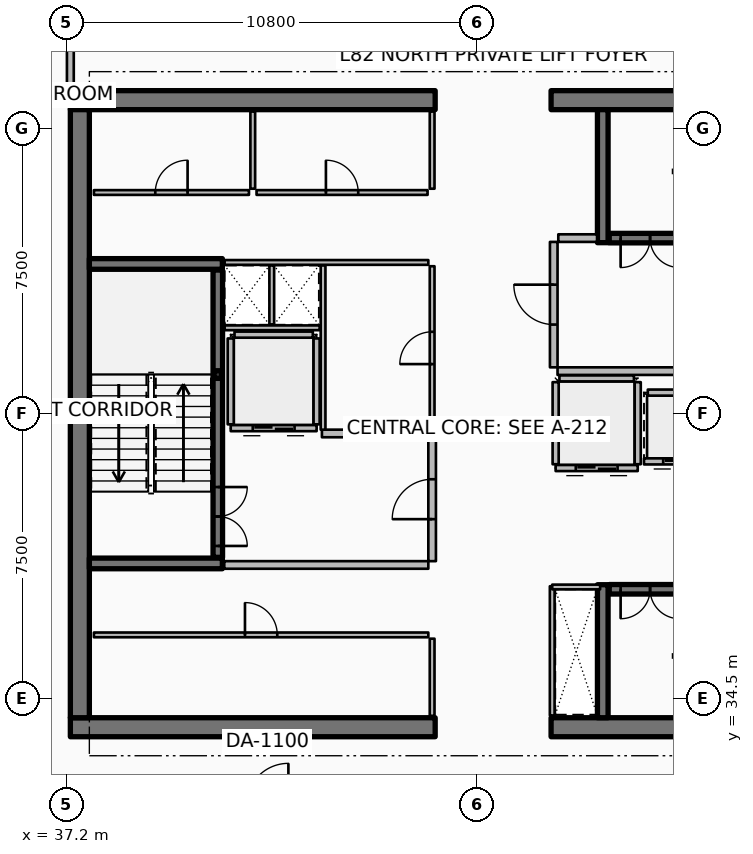
"""IFC4 building model, lengths in metres.
Left out: names, types, materials, properties, quantities, classifications, styles, units other than length and angle.
Written with IfcOpenShell. Run it as: python <this file> out.ifc"""

import sys

from ifc_helpers import new_model, si_unit, direction, frame, frame_2d, origin, origin_2d, place, context, subcontext, project, spatial, rectangle, hollow_rectangle, extrude, element, fill, save


model = new_model("IFC4")
c1 = context("Model", 3, precision=1e-05, world=origin(), true_north=direction((0.0, 1.0)))
c2 = subcontext(c1, "Body", "Model", "MODEL_VIEW")
j1 = project(units=[si_unit("LENGTHUNIT", "METRE"), si_unit("PLANEANGLEUNIT", "RADIAN")], contexts=[c1])
p1 = place(None, origin())
s1 = spatial("IfcSite", under=j1, at=p1, CompositionType="ELEMENT")
p2 = place(p1, origin())
s2 = spatial("IfcBuilding", under=s1, at=p2, CompositionType="ELEMENT")
p3 = place(p2, frame((0.0, 0.0, 326.3)))
s3 = spatial("IfcBuildingStorey", under=s2, at=p3, CompositionType="ELEMENT", Elevation=326.3)
p4 = place(p3, frame((37.3, 33.75, 0.0), z_axis=(0.0, 0.0, 1.0), x_axis=(1.0, 0.0, 0.0)))
e1 = element("IfcWall", 1, at=p4, inside=s3, PredefinedType="SHEAR", context=c2, shape_type="SweptSolid", body=[
    extrude(rectangle(XDim=9.6, YDim=0.5, at=frame_2d((4.8, 0.0))), origin(), (0.0, 0.0, 1.0), 4.2),
])
p5 = place(p3, frame((49.95, 33.75, 0.0), z_axis=(0.0, 0.0, 1.0), x_axis=(1.0, 0.0, 0.0)))
e2 = element("IfcWall", 2, at=p5, inside=s3, PredefinedType="SHEAR", context=c2, shape_type="SweptSolid", body=[
    extrude(rectangle(XDim=9.6, YDim=0.5, at=frame_2d((4.8, 0.0))), origin(), (0.0, 0.0, 1.0), 4.2),
])
p6 = place(p3, frame((37.3, 50.25, 0.0), z_axis=(0.0, 0.0, 1.0), x_axis=(1.0, 0.0, 0.0)))
e3 = element("IfcWall", 3, at=p6, inside=s3, PredefinedType="SHEAR", context=c2, shape_type="SweptSolid", body=[
    extrude(rectangle(XDim=9.6, YDim=0.5, at=frame_2d((4.8, 0.0))), origin(), (0.0, 0.0, 1.0), 4.2),
])
p7 = place(p3, frame((49.95, 50.25, 0.0), z_axis=(0.0, 0.0, 1.0), x_axis=(1.0, 0.0, 0.0)))
e4 = element("IfcWall", 4, at=p7, inside=s3, PredefinedType="SHEAR", context=c2, shape_type="SweptSolid", body=[
    extrude(rectangle(XDim=9.6, YDim=0.5, at=frame_2d((4.8, 0.0))), origin(), (0.0, 0.0, 1.0), 4.2),
])
p8 = place(p3, frame((37.55, 34.0, 0.0), z_axis=(0.0, 0.0, 1.0), x_axis=(0.0, 1.0, 0.0)))
e5 = element("IfcWall", 5, at=p8, inside=s3, PredefinedType="SHEAR", context=c2, shape_type="SweptSolid", body=[
    extrude(rectangle(XDim=16.0, YDim=0.5, at=frame_2d((8.0, 0.0))), origin(), (0.0, 0.0, 1.0), 4.2),
])
for number, where, z_axis, x_axis in (
    (6, (37.8, 38.06, 0.0), (0.0, 0.0, 1.0), (1.0, 0.0, 0.0)),
    (7, (37.8, 45.94, 0.0), (0.0, 0.0, 1.0), (1.0, 0.0, 0.0)),
    (8, (51.31, 46.5, 0.0), (0.0, 0.0, 1.0), (0.0, 1.0, 0.0)),
    (9, (51.31, 34.0, 0.0), (0.0, 0.0, 1.0), (0.0, 1.0, 0.0)),
):
    element("IfcWall", number, at=place(p3, frame(where, z_axis=z_axis, x_axis=x_axis)), inside=s3, PredefinedType="SHEAR", context=c2, shape_type="SweptSolid", body=[
        extrude(rectangle(XDim=3.5, YDim=0.28, at=frame_2d((1.75, 0.0))), origin(), (0.0, 0.0, 1.0), 4.2),
    ])
p9 = place(p3, frame((41.18, 43.03, 0.0), z_axis=(0.0, 0.0, 1.0), x_axis=(1.0, 0.0, 0.0)))
e10 = element("IfcColumn", 10, at=p9, inside=s3, PredefinedType="COLUMN", context=c2, shape_type="SweptSolid", body=[
    extrude(hollow_rectangle(XDim=0.2, YDim=0.2, WallThickness=0.01, InnerFilletRadius=0.01, OuterFilletRadius=0.02, at=origin_2d()), origin(), (0.0, 0.0, 1.0), 1.895),
])
p10 = place(p3, frame((41.18, 38.22, 0.0), z_axis=(0.0, 0.0, 1.0), x_axis=(0.0, 1.0, 0.0)))
e11 = element("IfcWall", 11, at=p10, inside=s3, PredefinedType="SOLIDWALL", context=c2, shape_type="SweptSolid", body=[
    extrude(rectangle(XDim=7.56, YDim=0.25, at=frame_2d((3.78, 0.0))), origin(), (0.0, 0.0, 1.0), 3.94),
])
p11 = place(p10, frame((0.3, 0.0, 0.0)))
e12 = element("IfcOpeningElement", 12, at=p11, cuts=e11, PredefinedType="OPENING", context=c2, shape_type="SweptSolid", body=[
    extrude(rectangle(XDim=1.55, YDim=2.15, at=frame_2d((0.775, 1.075))), frame((0.0, 0.135, 0.0), z_axis=(0.0, -1.0, 0.0), x_axis=(1.0, 0.0, 0.0)), (0.0, 0.0, 1.0), 0.27),
])
p12 = place(p3, frame((51.48, 46.62, 0.0), z_axis=(0.0, 0.0, 1.0), x_axis=(1.0, 0.0, 0.0)))
e13 = element("IfcWall", 13, at=p12, inside=s3, PredefinedType="SOLIDWALL", context=c2, shape_type="SweptSolid", body=[
    extrude(rectangle(XDim=7.54, YDim=0.25, at=frame_2d((3.77, 0.0))), origin(), (0.0, 0.0, 1.0), 3.94),
])
p13 = place(p12, frame((0.3, 0.0, 0.0)))
e14 = element("IfcOpeningElement", 14, at=p13, cuts=e13, PredefinedType="OPENING", context=c2, shape_type="SweptSolid", body=[
    extrude(rectangle(XDim=1.55, YDim=2.15, at=frame_2d((0.775, 1.075))), frame((0.0, 0.135, 0.0), z_axis=(0.0, -1.0, 0.0), x_axis=(1.0, 0.0, 0.0)), (0.0, 0.0, 1.0), 0.27),
])
p14 = place(p3, frame((51.48, 37.38, 0.0), z_axis=(0.0, 0.0, 1.0), x_axis=(1.0, 0.0, 0.0)))
e15 = element("IfcWall", 15, at=p14, inside=s3, PredefinedType="SOLIDWALL", context=c2, shape_type="SweptSolid", body=[
    extrude(rectangle(XDim=7.54, YDim=0.25, at=frame_2d((3.77, 0.0))), origin(), (0.0, 0.0, 1.0), 3.94),
])
p15 = place(p14, frame((0.3, 0.0, 0.0)))
e16 = element("IfcOpeningElement", 16, at=p15, cuts=e15, PredefinedType="OPENING", context=c2, shape_type="SweptSolid", body=[
    extrude(rectangle(XDim=1.55, YDim=2.15, at=frame_2d((0.775, 1.075))), frame((0.0, 0.135, 0.0), z_axis=(0.0, -1.0, 0.0), x_axis=(1.0, 0.0, 0.0)), (0.0, 0.0, 1.0), 0.27),
])
p16 = place(p3, frame((54.505, 40.745, 0.0), z_axis=(0.0, 0.0, 1.0), x_axis=(-1.0, 0.0, 0.0)))
e17 = element("IfcWall", 17, at=p16, inside=s3, PredefinedType="PARTITIONING", context=c2, shape_type="SweptSolid", body=[
    extrude(rectangle(XDim=2.11, YDim=0.16, at=frame_2d((1.055, 0.0))), origin(), (0.0, 0.0, 1.0), 3.94),
])
p17 = place(p16, frame((0.505, 0.0, 0.0)))
e18 = element("IfcOpeningElement", 18, at=p17, cuts=e17, PredefinedType="OPENING", context=c2, shape_type="SweptSolid", body=[
    extrude(rectangle(XDim=1.1, YDim=2.1, at=frame_2d((0.55, 1.05))), frame((0.0, 0.09, 0.0), z_axis=(0.0, -1.0, 0.0), x_axis=(1.0, 0.0, 0.0)), (0.0, 0.0, 1.0), 0.18),
])
p18 = place(p3, frame((52.495, 42.555, 0.0), z_axis=(0.0, 0.0, 1.0), x_axis=(1.0, 0.0, 0.0)))
e19 = element("IfcWall", 19, at=p18, inside=s3, PredefinedType="PARTITIONING", context=c2, shape_type="SweptSolid", body=[
    extrude(rectangle(XDim=1.91, YDim=0.16, at=frame_2d((0.955, 0.0))), origin(), (0.0, 0.0, 1.0), 3.94),
])
p19 = place(p3, frame((43.78, 41.62, 0.0), z_axis=(0.0, 0.0, 1.0), x_axis=(-1.0, 0.0, 0.0)))
e20 = element("IfcWall", 20, at=p19, inside=s3, PredefinedType="PARTITIONING", context=c2, shape_type="SweptSolid", body=[
    extrude(rectangle(XDim=2.26, YDim=0.16, at=frame_2d((1.13, 0.0))), origin(), (0.0, 0.0, 1.0), 3.94),
])
p20 = place(p19, frame((0.58, 0.0, 0.0)))
e21 = element("IfcOpeningElement", 21, at=p20, cuts=e20, PredefinedType="OPENING", context=c2, shape_type="SweptSolid", body=[
    extrude(rectangle(XDim=1.1, YDim=2.1, at=frame_2d((0.55, 1.05))), frame((0.0, 0.09, 0.0), z_axis=(0.0, -1.0, 0.0), x_axis=(1.0, 0.0, 0.0)), (0.0, 0.0, 1.0), 0.18),
])
for number, where, z_axis, x_axis in (
    (22, (43.78, 41.72, 0.0), (0.0, 0.0, 1.0), (0.0, 1.0, 0.0)),
    (23, (41.52, 41.72, 0.0), (0.0, 0.0, 1.0), (0.0, 1.0, 0.0)),
):
    element("IfcWall", number, at=place(p3, frame(where, z_axis=z_axis, x_axis=x_axis)), inside=s3, PredefinedType="PARTITIONING", context=c2, shape_type="SweptSolid", body=[
        extrude(rectangle(XDim=2.26, YDim=0.16, at=frame_2d((1.13, 0.0))), origin(), (0.0, 0.0, 1.0), 3.94),
    ])
p21 = place(p3, frame((41.62, 44.08, 0.0), z_axis=(0.0, 0.0, 1.0), x_axis=(1.0, 0.0, 0.0)))
e24 = element("IfcWall", 24, at=p21, inside=s3, PredefinedType="PARTITIONING", context=c2, shape_type="SweptSolid", body=[
    extrude(rectangle(XDim=2.06, YDim=0.16, at=frame_2d((1.03, 0.0))), origin(), (0.0, 0.0, 1.0), 3.94),
])
p22 = place(p3, frame((52.23, 40.57, 0.0), z_axis=(0.0, 0.0, 1.0), x_axis=(-1.0, 0.0, 0.0)))
e25 = element("IfcWall", 25, at=p22, inside=s3, PredefinedType="PARTITIONING", context=c2, shape_type="SweptSolid", body=[
    extrude(rectangle(XDim=2.16, YDim=0.16, at=frame_2d((1.08, 0.0))), origin(), (0.0, 0.0, 1.0), 3.94),
])
p23 = place(p22, frame((0.53, 0.0, 0.0)))
e26 = element("IfcOpeningElement", 26, at=p23, cuts=e25, PredefinedType="OPENING", context=c2, shape_type="SweptSolid", body=[
    extrude(rectangle(XDim=1.1, YDim=2.1, at=frame_2d((0.55, 1.05))), frame((0.0, 0.09, 0.0), z_axis=(0.0, -1.0, 0.0), x_axis=(1.0, 0.0, 0.0)), (0.0, 0.0, 1.0), 0.18),
])
for number, where, z_axis, x_axis in (
    (27, (52.23, 40.67, 0.0), (0.0, 0.0, 1.0), (0.0, 1.0, 0.0)),
    (28, (50.07, 40.67, 0.0), (0.0, 0.0, 1.0), (0.0, 1.0, 0.0)),
):
    element("IfcWall", number, at=place(p3, frame(where, z_axis=z_axis, x_axis=x_axis)), inside=s3, PredefinedType="PARTITIONING", context=c2, shape_type="SweptSolid", body=[
        extrude(rectangle(XDim=2.16, YDim=0.16, at=frame_2d((1.08, 0.0))), origin(), (0.0, 0.0, 1.0), 3.94),
    ])
p24 = place(p3, frame((50.17, 42.93, 0.0), z_axis=(0.0, 0.0, 1.0), x_axis=(1.0, 0.0, 0.0)))
e29 = element("IfcWall", 29, at=p24, inside=s3, PredefinedType="PARTITIONING", context=c2, shape_type="SweptSolid", body=[
    extrude(rectangle(XDim=1.96, YDim=0.16, at=frame_2d((0.98, 0.0))), origin(), (0.0, 0.0, 1.0), 3.94),
])
p25 = place(p3, frame((46.82, 34.05, 0.0), z_axis=(0.0, 0.0, 1.0), x_axis=(0.0, 1.0, 0.0)))
e30 = element("IfcWall", 30, at=p25, inside=s3, PredefinedType="PARTITIONING", context=c2, shape_type="SweptSolid", body=[
    extrude(rectangle(XDim=2.03, YDim=0.125, at=frame_2d((1.015, 0.0))), origin(), (0.0, 0.0, 1.0), 3.38),
])
p26 = place(p3, frame((37.92, 36.18, 0.0), z_axis=(0.0, 0.0, 1.0), x_axis=(1.0, 0.0, 0.0)))
e31 = element("IfcWall", 31, at=p26, inside=s3, PredefinedType="PARTITIONING", context=c2, shape_type="SweptSolid", body=[
    extrude(rectangle(XDim=8.8, YDim=0.125, at=frame_2d((4.4, 0.0))), origin(), (0.0, 0.0, 1.0), 3.38),
])
p27 = place(p26, frame((3.975, 0.0, 0.0)))
e32 = element("IfcOpeningElement", 32, at=p27, cuts=e31, PredefinedType="OPENING", context=c2, shape_type="SweptSolid", body=[
    extrude(rectangle(XDim=0.85, YDim=2.06, at=frame_2d((0.425, 1.03))), frame((0.0, 0.073, 0.0), z_axis=(0.0, -1.0, 0.0), x_axis=(1.0, 0.0, 0.0)), (0.0, 0.0, 1.0), 0.145),
])
for number, where, z_axis, x_axis in (
    (33, (46.82, 47.92, 0.0), (0.0, 0.0, 1.0), (0.0, 1.0, 0.0)),
    (34, (42.1, 47.92, 0.0), (0.0, 0.0, 1.0), (0.0, 1.0, 0.0)),
):
    element("IfcWall", number, at=place(p3, frame(where, z_axis=z_axis, x_axis=x_axis)), inside=s3, PredefinedType="PARTITIONING", context=c2, shape_type="SweptSolid", body=[
        extrude(rectangle(XDim=2.03, YDim=0.125, at=frame_2d((1.015, 0.0))), origin(), (0.0, 0.0, 1.0), 3.38),
    ])
p28 = place(p3, frame((37.92, 47.82, 0.0), z_axis=(0.0, 0.0, 1.0), x_axis=(1.0, 0.0, 0.0)))
e35 = element("IfcWall", 35, at=p28, inside=s3, PredefinedType="PARTITIONING", context=c2, shape_type="SweptSolid", body=[
    extrude(rectangle(XDim=4.08, YDim=0.125, at=frame_2d((2.04, 0.0))), origin(), (0.0, 0.0, 1.0), 3.38),
])
p29 = place(p28, frame((1.615, 0.0, 0.0)))
e36 = element("IfcOpeningElement", 36, at=p29, cuts=e35, PredefinedType="OPENING", context=c2, shape_type="SweptSolid", body=[
    extrude(rectangle(XDim=0.85, YDim=2.06, at=frame_2d((0.425, 1.03))), frame((0.0, 0.073, 0.0), z_axis=(0.0, -1.0, 0.0), x_axis=(1.0, 0.0, 0.0)), (0.0, 0.0, 1.0), 0.145),
])
p30 = place(p3, frame((42.2, 47.82, 0.0), z_axis=(0.0, 0.0, 1.0), x_axis=(1.0, 0.0, 0.0)))
e37 = element("IfcWall", 37, at=p30, inside=s3, PredefinedType="PARTITIONING", context=c2, shape_type="SweptSolid", body=[
    extrude(rectangle(XDim=4.5, YDim=0.125, at=frame_2d((2.25, 0.0))), origin(), (0.0, 0.0, 1.0), 3.38),
])
p31 = place(p30, frame((1.825, 0.0, 0.0)))
e38 = element("IfcOpeningElement", 38, at=p31, cuts=e37, PredefinedType="OPENING", context=c2, shape_type="SweptSolid", body=[
    extrude(rectangle(XDim=0.85, YDim=2.06, at=frame_2d((0.425, 1.03))), frame((0.0, 0.073, 0.0), z_axis=(0.0, -1.0, 0.0), x_axis=(1.0, 0.0, 0.0)), (0.0, 0.0, 1.0), 0.145),
])
p32 = place(p3, frame((41.35, 38.02, 0.0), z_axis=(0.0, 0.0, 1.0), x_axis=(1.0, 0.0, 0.0)))
e39 = element("IfcWall", 39, at=p32, inside=s3, PredefinedType="PARTITIONING", context=c2, shape_type="SweptSolid", body=[
    extrude(rectangle(XDim=5.37, YDim=0.2, at=frame_2d((2.685, 0.0))), origin(), (0.0, 0.0, 1.0), 3.94),
])
p33 = place(p3, frame((43.92, 41.48, 0.0), z_axis=(0.0, 0.0, 1.0), x_axis=(1.0, 0.0, 0.0)))
e40 = element("IfcWall", 40, at=p33, inside=s3, PredefinedType="PARTITIONING", context=c2, shape_type="SweptSolid", body=[
    extrude(rectangle(XDim=2.8, YDim=0.2, at=frame_2d((1.4, 0.0))), origin(), (0.0, 0.0, 1.0), 3.94),
])
p34 = place(p3, frame((46.82, 38.12, 0.0), z_axis=(0.0, 0.0, 1.0), x_axis=(0.0, 1.0, 0.0)))
e41 = element("IfcWall", 41, at=p34, inside=s3, PredefinedType="PARTITIONING", context=c2, shape_type="SweptSolid", body=[
    extrude(rectangle(XDim=3.26, YDim=0.2, at=frame_2d((1.63, 0.0))), origin(), (0.0, 0.0, 1.0), 3.94),
])
p35 = place(p34, frame((1.105, 0.0, 0.0)))
e42 = element("IfcOpeningElement", 42, at=p35, cuts=e41, PredefinedType="OPENING", context=c2, shape_type="SweptSolid", body=[
    extrude(rectangle(XDim=1.05, YDim=2.1, at=frame_2d((0.525, 1.05))), frame((0.0, 0.11, 0.0), z_axis=(0.0, -1.0, 0.0), x_axis=(1.0, 0.0, 0.0)), (0.0, 0.0, 1.0), 0.22),
])
p36 = place(p3, frame((50.12, 43.12, 0.0), z_axis=(0.0, 0.0, 1.0), x_axis=(1.0, 0.0, 0.0)))
e43 = element("IfcWall", 43, at=p36, inside=s3, PredefinedType="PARTITIONING", context=c2, shape_type="SweptSolid", body=[
    extrude(rectangle(XDim=8.88, YDim=0.2, at=frame_2d((4.44, 0.0))), origin(), (0.0, 0.0, 1.0), 3.94),
])
p37 = place(p3, frame((50.14, 46.62, 0.0), z_axis=(0.0, 0.0, 1.0), x_axis=(1.0, 0.0, 0.0)))
e44 = element("IfcWall", 44, at=p37, inside=s3, PredefinedType="PARTITIONING", context=c2, shape_type="SweptSolid", body=[
    extrude(rectangle(XDim=1.02, YDim=0.2, at=frame_2d((0.51, 0.0))), origin(), (0.0, 0.0, 1.0), 3.94),
])
p38 = place(p3, frame((50.02, 43.22, 0.0), z_axis=(0.0, 0.0, 1.0), x_axis=(0.0, 1.0, 0.0)))
e45 = element("IfcWall", 45, at=p38, inside=s3, PredefinedType="PARTITIONING", context=c2, shape_type="SweptSolid", body=[
    extrude(rectangle(XDim=3.3, YDim=0.2, at=frame_2d((1.65, 0.0))), origin(), (0.0, 0.0, 1.0), 3.94),
])
p39 = place(p38, frame((1.125, 0.0, 0.0)))
e46 = element("IfcOpeningElement", 46, at=p39, cuts=e45, PredefinedType="OPENING", context=c2, shape_type="SweptSolid", body=[
    extrude(rectangle(XDim=1.05, YDim=2.1, at=frame_2d((0.525, 1.05))), frame((0.0, 0.11, 0.0), z_axis=(0.0, -1.0, 0.0), x_axis=(1.0, 0.0, 0.0)), (0.0, 0.0, 1.0), 0.22),
])
p40 = place(p3, frame((41.36, 45.98, 0.0), z_axis=(0.0, 0.0, 1.0), x_axis=(1.0, 0.0, 0.0)))
e47 = element("IfcWall", 47, at=p40, inside=s3, PredefinedType="PARTITIONING", context=c2, shape_type="SweptSolid", body=[
    extrude(rectangle(XDim=5.36, YDim=0.125, at=frame_2d((2.68, 0.0))), origin(), (0.0, 0.0, 1.0), 3.38),
])
p41 = place(p3, frame((41.36, 44.26, 0.0), z_axis=(0.0, 0.0, 1.0), x_axis=(1.0, 0.0, 0.0)))
e48 = element("IfcWall", 48, at=p41, inside=s3, PredefinedType="PARTITIONING", context=c2, shape_type="SweptSolid", body=[
    extrude(rectangle(XDim=2.5, YDim=0.125, at=frame_2d((1.25, 0.0))), origin(), (0.0, 0.0, 1.0), 3.38),
])
p42 = place(p3, frame((42.6, 44.35, 0.0), z_axis=(0.0, 0.0, 1.0), x_axis=(0.0, 1.0, 0.0)))
e49 = element("IfcWall", 49, at=p42, inside=s3, PredefinedType="PARTITIONING", context=c2, shape_type="SweptSolid", body=[
    extrude(rectangle(XDim=1.55, YDim=0.125, at=frame_2d((0.775, 0.0))), origin(), (0.0, 0.0, 1.0), 3.38),
])
p43 = place(p3, frame((49.98, 34.06, 0.0), z_axis=(0.0, 0.0, 1.0), x_axis=(0.0, 1.0, 0.0)))
e50 = element("IfcWall", 50, at=p43, inside=s3, PredefinedType="PARTITIONING", context=c2, shape_type="SweptSolid", body=[
    extrude(rectangle(XDim=3.4, YDim=0.125, at=frame_2d((1.7, 0.0))), origin(), (0.0, 0.0, 1.0), 3.38),
])
p44 = place(p3, frame((49.98, 37.44, 0.0), z_axis=(0.0, 0.0, 1.0), x_axis=(1.0, 0.0, 0.0)))
e51 = element("IfcWall", 51, at=p44, inside=s3, PredefinedType="PARTITIONING", context=c2, shape_type="SweptSolid", body=[
    extrude(rectangle(XDim=1.26, YDim=0.125, at=frame_2d((0.63, 0.0))), origin(), (0.0, 0.0, 1.0), 3.38),
])
p45 = place(p3, frame((43.95, 41.58, 0.0), z_axis=(0.0, 0.0, 1.0), x_axis=(0.0, 1.0, 0.0)))
e52 = element("IfcWall", 52, at=p45, inside=s3, PredefinedType="PARTITIONING", context=c2, shape_type="SweptSolid", body=[
    extrude(rectangle(XDim=4.32, YDim=0.125, at=frame_2d((2.16, 0.0))), origin(), (0.0, 0.0, 1.0), 3.38),
])
p46 = place(p3, frame((46.82, 41.58, 0.0), z_axis=(0.0, 0.0, 1.0), x_axis=(0.0, 1.0, 0.0)))
e53 = element("IfcWall", 53, at=p46, inside=s3, PredefinedType="PARTITIONING", context=c2, shape_type="SweptSolid", body=[
    extrude(rectangle(XDim=4.3, YDim=0.125, at=frame_2d((2.15, 0.0))), origin(), (0.0, 0.0, 1.0), 3.38),
])
p47 = place(p46, frame((1.725, 0.0, 0.0)))
e54 = element("IfcOpeningElement", 54, at=p47, cuts=e53, PredefinedType="OPENING", context=c2, shape_type="SweptSolid", body=[
    extrude(rectangle(XDim=0.85, YDim=2.06, at=frame_2d((0.425, 1.03))), frame((0.0, 0.073, 0.0), z_axis=(0.0, -1.0, 0.0), x_axis=(1.0, 0.0, 0.0)), (0.0, 0.0, 1.0), 0.145),
])
p48 = place(p3, frame((37.3, 52.18, 0.0), z_axis=(0.0, 0.0, 1.0), x_axis=(0.0, -1.0, 0.0)))
e55 = element("IfcWall", 55, at=p48, inside=s3, PredefinedType="PARTITIONING", context=c2, shape_type="SweptSolid", body=[
    extrude(rectangle(XDim=1.625, YDim=0.18, at=frame_2d((0.812, 0.0))), origin(), (0.0, 0.0, 1.0), 3.38),
])
p49 = place(p11, origin())
e56 = element("IfcDoor", 56, at=p49, inside=s3, OperationType="DOUBLE_DOOR_SINGLE_SWING", PredefinedType="DOOR", context=c2, shape_type="SweptSolid", body=[
    extrude(rectangle(XDim=1.55, YDim=2.15, at=frame_2d((0.775, 1.075))), frame((0.0, 0.025, 0.0), z_axis=(0.0, -1.0, 0.0), x_axis=(1.0, 0.0, 0.0)), (0.0, 0.0, 1.0), 0.05),
])
fill(e12, e56)
p50 = place(p13, origin())
e57 = element("IfcDoor", 57, at=p50, inside=s3, OperationType="DOUBLE_DOOR_SINGLE_SWING", PredefinedType="DOOR", context=c2, shape_type="SweptSolid", body=[
    extrude(rectangle(XDim=1.55, YDim=2.15, at=frame_2d((0.775, 1.075))), frame((0.0, 0.025, 0.0), z_axis=(0.0, -1.0, 0.0), x_axis=(1.0, 0.0, 0.0)), (0.0, 0.0, 1.0), 0.05),
])
fill(e14, e57)
p51 = place(p15, origin())
e58 = element("IfcDoor", 58, at=p51, inside=s3, OperationType="DOUBLE_DOOR_SINGLE_SWING", PredefinedType="DOOR", context=c2, shape_type="SweptSolid", body=[
    extrude(rectangle(XDim=1.55, YDim=2.15, at=frame_2d((0.775, 1.075))), frame((0.0, 0.025, 0.0), z_axis=(0.0, -1.0, 0.0), x_axis=(1.0, 0.0, 0.0)), (0.0, 0.0, 1.0), 0.05),
])
fill(e16, e58)
p52 = place(p17, origin())
e59 = element("IfcDoor", 59, at=p52, inside=s3, OperationType="DOUBLE_DOOR_SLIDING", PredefinedType="DOOR", context=c2, shape_type="SweptSolid", body=[
    extrude(rectangle(XDim=1.1, YDim=2.1, at=frame_2d((0.55, 1.05))), frame((0.0, 0.025, 0.0), z_axis=(0.0, -1.0, 0.0), x_axis=(1.0, 0.0, 0.0)), (0.0, 0.0, 1.0), 0.05),
])
fill(e18, e59)
p53 = place(p20, origin())
e60 = element("IfcDoor", 60, at=p53, inside=s3, OperationType="DOUBLE_DOOR_SLIDING", PredefinedType="DOOR", context=c2, shape_type="SweptSolid", body=[
    extrude(rectangle(XDim=1.1, YDim=2.1, at=frame_2d((0.55, 1.05))), frame((0.0, 0.025, 0.0), z_axis=(0.0, -1.0, 0.0), x_axis=(1.0, 0.0, 0.0)), (0.0, 0.0, 1.0), 0.05),
])
fill(e21, e60)
p54 = place(p23, origin())
e61 = element("IfcDoor", 61, at=p54, inside=s3, OperationType="DOUBLE_DOOR_SLIDING", PredefinedType="DOOR", context=c2, shape_type="SweptSolid", body=[
    extrude(rectangle(XDim=1.1, YDim=2.1, at=frame_2d((0.55, 1.05))), frame((0.0, 0.025, 0.0), z_axis=(0.0, -1.0, 0.0), x_axis=(1.0, 0.0, 0.0)), (0.0, 0.0, 1.0), 0.05),
])
fill(e26, e61)
p55 = place(p27, origin())
e62 = element("IfcDoor", 62, at=p55, inside=s3, OperationType="SINGLE_SWING_LEFT", PredefinedType="DOOR", context=c2, shape_type="SweptSolid", body=[
    extrude(rectangle(XDim=0.85, YDim=2.06, at=frame_2d((0.425, 1.03))), frame((0.0, 0.025, 0.0), z_axis=(0.0, -1.0, 0.0), x_axis=(1.0, 0.0, 0.0)), (0.0, 0.0, 1.0), 0.05),
])
fill(e32, e62)
p56 = place(p29, origin())
e63 = element("IfcDoor", 63, at=p56, inside=s3, OperationType="SINGLE_SWING_RIGHT", PredefinedType="DOOR", context=c2, shape_type="SweptSolid", body=[
    extrude(rectangle(XDim=0.85, YDim=2.06, at=frame_2d((0.425, 1.03))), frame((0.0, 0.025, 0.0), z_axis=(0.0, -1.0, 0.0), x_axis=(1.0, 0.0, 0.0)), (0.0, 0.0, 1.0), 0.05),
])
fill(e36, e63)
p57 = place(p31, origin())
e64 = element("IfcDoor", 64, at=p57, inside=s3, OperationType="SINGLE_SWING_LEFT", PredefinedType="DOOR", context=c2, shape_type="SweptSolid", body=[
    extrude(rectangle(XDim=0.85, YDim=2.06, at=frame_2d((0.425, 1.03))), frame((0.0, 0.025, 0.0), z_axis=(0.0, -1.0, 0.0), x_axis=(1.0, 0.0, 0.0)), (0.0, 0.0, 1.0), 0.05),
])
fill(e38, e64)
p58 = place(p35, origin())
e65 = element("IfcDoor", 65, at=p58, inside=s3, OperationType="SINGLE_SWING_LEFT", PredefinedType="DOOR", context=c2, shape_type="SweptSolid", body=[
    extrude(rectangle(XDim=1.05, YDim=2.1, at=frame_2d((0.525, 1.05))), frame((0.0, 0.025, 0.0), z_axis=(0.0, -1.0, 0.0), x_axis=(1.0, 0.0, 0.0)), (0.0, 0.0, 1.0), 0.05),
])
fill(e42, e65)
p59 = place(p39, origin())
e66 = element("IfcDoor", 66, at=p59, inside=s3, OperationType="SINGLE_SWING_RIGHT", PredefinedType="DOOR", context=c2, shape_type="SweptSolid", body=[
    extrude(rectangle(XDim=1.05, YDim=2.1, at=frame_2d((0.525, 1.05))), frame((0.0, 0.025, 0.0), z_axis=(0.0, -1.0, 0.0), x_axis=(1.0, 0.0, 0.0)), (0.0, 0.0, 1.0), 0.05),
])
fill(e46, e66)
p60 = place(p47, origin())
e67 = element("IfcDoor", 67, at=p60, inside=s3, OperationType="SINGLE_SWING_LEFT", PredefinedType="DOOR", context=c2, shape_type="SweptSolid", body=[
    extrude(rectangle(XDim=0.85, YDim=2.06, at=frame_2d((0.425, 1.03))), frame((0.0, 0.025, 0.0), z_axis=(0.0, -1.0, 0.0), x_axis=(1.0, 0.0, 0.0)), (0.0, 0.0, 1.0), 0.05),
])
fill(e54, e67)
save(model, sys.argv[1])
